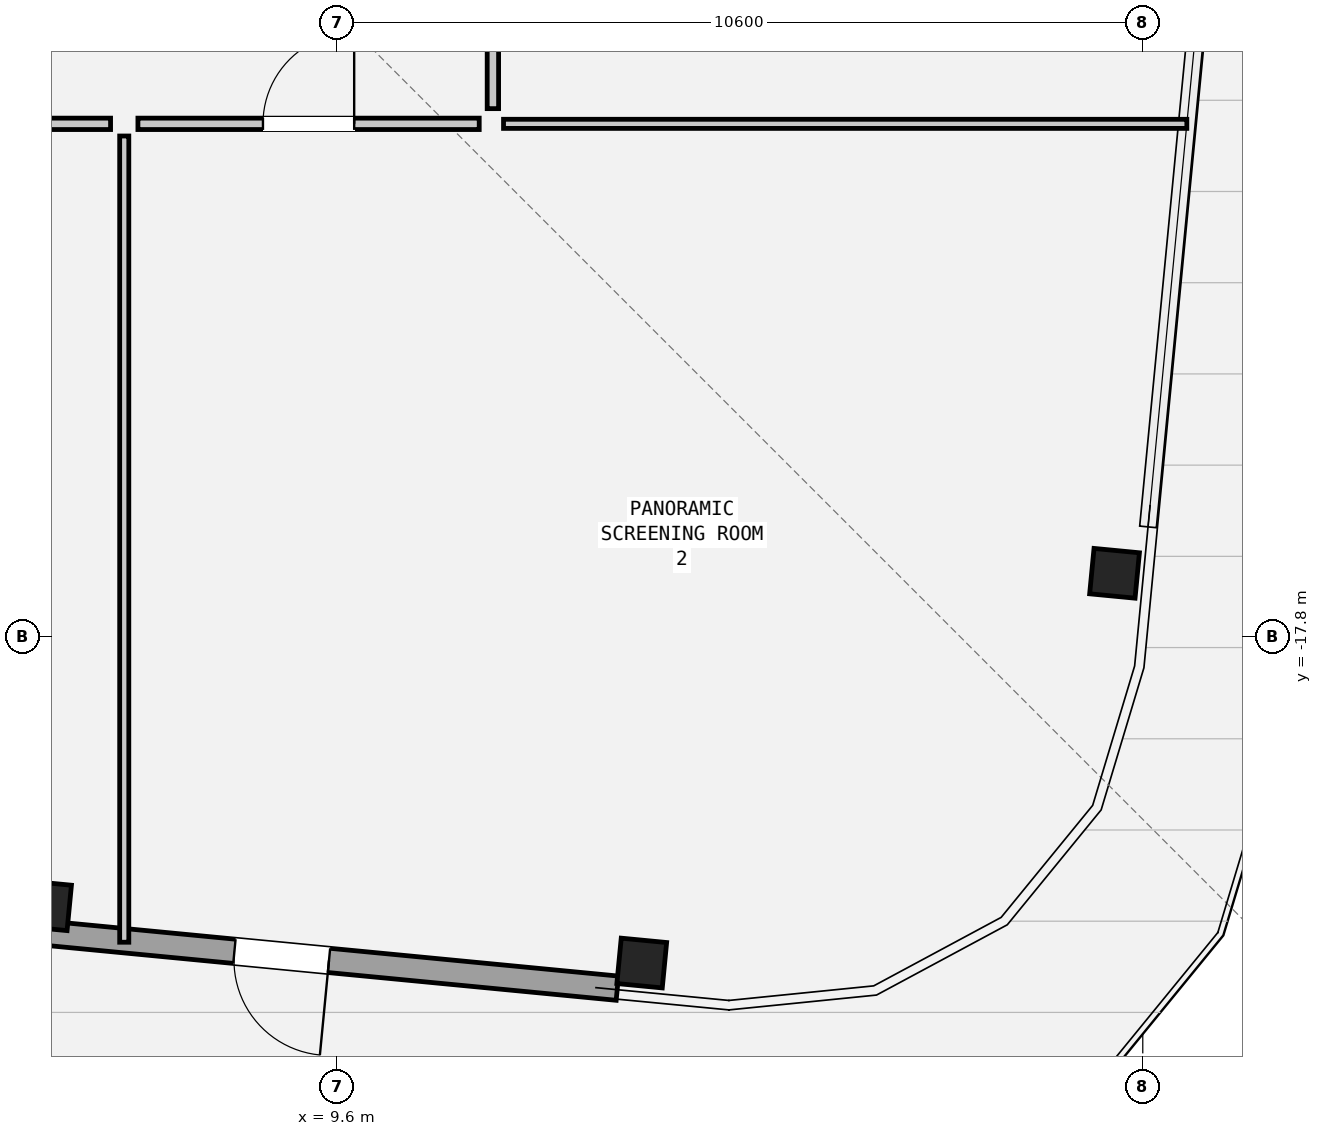
"""IFC4 building model, lengths in metres.
Left out: names, types, materials, properties, quantities, classifications, styles, units other than length and angle.
Written with IfcOpenShell. Run it as: python <this file> out.ifc"""

import sys

from ifc_helpers import new_model, si_unit, direction, frame, frame_2d, origin, origin_2d, place, context, subcontext, project, spatial, rectangle, hollow_rectangle, extrude, element, fill, save


model = new_model("IFC4")
c1 = context("Model", 3, precision=1e-05, world=origin(), true_north=direction((0.0, 1.0)))
c2 = subcontext(c1, "Body", "Model", "MODEL_VIEW")
j1 = project(units=[si_unit("LENGTHUNIT", "METRE"), si_unit("PLANEANGLEUNIT", "RADIAN")], contexts=[c1])
p1 = place(None, origin())
s1 = spatial("IfcSite", under=j1, at=p1, CompositionType="ELEMENT")
p2 = place(p1, origin())
s2 = spatial("IfcBuilding", under=s1, at=p2, CompositionType="ELEMENT")
p3 = place(p2, frame((0.0, 0.0, 276.95)))
s3 = spatial("IfcBuildingStorey", under=s2, at=p3, CompositionType="ELEMENT", Elevation=276.95)
for number, where, z_axis, x_axis in (
    (1, (5.778, -21.336, 0.0), (0.0, 0.0, 1.0), (0.995, -0.096, 0.0)),
    (2, (13.608, -22.09, 0.0), (0.0, 0.0, 1.0), (0.995, -0.096, 0.0)),
    (3, (19.829, -16.963, 0.0), (0.0, 0.0, 1.0), (0.096, 0.995, 0.0)),
):
    element("IfcColumn", number, at=place(p3, frame(where, z_axis=z_axis, x_axis=x_axis)), inside=s3, PredefinedType="COLUMN", context=c2, shape_type="SweptSolid", body=[
        extrude(hollow_rectangle(XDim=0.6, YDim=0.6, WallThickness=0.04, at=origin_2d()), origin(), (0.0, 0.0, 1.0), 3.6),
    ])
p4 = place(p3, frame((13.287, -22.421, 0.0), z_axis=(0.0, 0.0, 1.0), x_axis=(-0.995396042099, 0.095847375411, 0.0)))
e4 = element("IfcWall", 4, at=p4, inside=s3, PredefinedType="SOLIDWALL", context=c2, shape_type="SweptSolid", body=[
    extrude(rectangle(XDim=23.024, YDim=0.32, at=frame_2d((11.512, 0.0))), origin(), (0.0, 0.0, 1.0), 2.984),
])
p5 = place(p4, frame((3.811, 0.0, 0.0)))
e5 = element("IfcOpeningElement", 5, at=p5, cuts=e4, PredefinedType="OPENING", context=c2, shape_type="SweptSolid", body=[
    extrude(rectangle(XDim=1.25, YDim=2.02, at=frame_2d((0.625, 1.01))), frame((0.0, 0.172, 0.0), z_axis=(0.0, -1.0, 0.0), x_axis=(1.0, 0.0, 0.0)), (0.0, 0.0, 1.0), 0.344),
])
p6 = place(p3, frame((11.79, -11.05, 0.0), z_axis=(0.0, 0.0, 1.0), x_axis=(1.0, 0.0, 0.0)))
e6 = element("IfcWall", 6, at=p6, inside=s3, PredefinedType="PARTITIONING", context=c2, shape_type="SweptSolid", body=[
    extrude(rectangle(XDim=8.99, YDim=0.12, at=frame_2d((4.495, 0.0))), origin(), (0.0, 0.0, 1.0), 3.41),
])
p7 = place(p3, frame((6.8, -21.817, 0.0), z_axis=(0.0, 0.0, 1.0), x_axis=(0.0, 1.0, 0.0)))
e7 = element("IfcWall", 7, at=p7, inside=s3, PredefinedType="PARTITIONING", context=c2, shape_type="SweptSolid", body=[
    extrude(rectangle(XDim=10.607, YDim=0.12, at=frame_2d((5.303, 0.0))), origin(), (0.0, 0.0, 1.0), 3.41),
])
p8 = place(p3, frame((0.18, -11.05, 0.0), z_axis=(0.0, 0.0, 1.0), x_axis=(1.0, 0.0, 0.0)))
e8 = element("IfcWall", 8, at=p8, inside=s3, PredefinedType="PARTITIONING", context=c2, shape_type="SweptSolid", body=[
    extrude(rectangle(XDim=6.44, YDim=0.15, at=frame_2d((3.22, 0.0))), origin(), (0.0, 0.0, 1.0), 3.41),
])
p9 = place(p8, frame((2.62, 0.0, 0.0)))
e9 = element("IfcOpeningElement", 9, at=p9, cuts=e8, PredefinedType="OPENING", context=c2, shape_type="SweptSolid", body=[
    extrude(rectangle(XDim=1.2, YDim=2.1, at=frame_2d((0.6, 1.05))), frame((0.0, 0.087, 0.0), z_axis=(0.0, -1.0, 0.0), x_axis=(1.0, 0.0, 0.0)), (0.0, 0.0, 1.0), 0.174),
])
p10 = place(p3, frame((6.98, -11.05, 0.0), z_axis=(0.0, 0.0, 1.0), x_axis=(1.0, 0.0, 0.0)))
e10 = element("IfcWall", 10, at=p10, inside=s3, PredefinedType="PARTITIONING", context=c2, shape_type="SweptSolid", body=[
    extrude(rectangle(XDim=4.49, YDim=0.15, at=frame_2d((2.245, 0.0))), origin(), (0.0, 0.0, 1.0), 3.41),
])
p11 = place(p10, frame((1.645, 0.0, 0.0)))
e11 = element("IfcOpeningElement", 11, at=p11, cuts=e10, PredefinedType="OPENING", context=c2, shape_type="SweptSolid", body=[
    extrude(rectangle(XDim=1.2, YDim=2.1, at=frame_2d((0.6, 1.05))), frame((0.0, 0.087, 0.0), z_axis=(0.0, -1.0, 0.0), x_axis=(1.0, 0.0, 0.0)), (0.0, 0.0, 1.0), 0.174),
])
p12 = place(p3, frame((11.65, -10.85, 0.0), z_axis=(0.0, 0.0, 1.0), x_axis=(0.0, 1.0, 0.0)))
e12 = element("IfcWall", 12, at=p12, inside=s3, PredefinedType="PARTITIONING", context=c2, shape_type="SweptSolid", body=[
    extrude(rectangle(XDim=8.29, YDim=0.15, at=frame_2d((4.145, 0.0))), origin(), (0.0, 0.0, 1.0), 3.41),
])
p13 = place(p12, frame((3.67, 0.0, 0.0)))
e13 = element("IfcOpeningElement", 13, at=p13, cuts=e12, PredefinedType="OPENING", context=c2, shape_type="SweptSolid", body=[
    extrude(rectangle(XDim=0.95, YDim=2.1, at=frame_2d((0.475, 1.05))), frame((0.0, 0.087, 0.0), z_axis=(0.0, -1.0, 0.0), x_axis=(1.0, 0.0, 0.0)), (0.0, 0.0, 1.0), 0.174),
])
p14 = place(p5, origin())
e14 = element("IfcDoor", 14, at=p14, inside=s3, OperationType="SINGLE_SWING_LEFT", PredefinedType="DOOR", context=c2, shape_type="SweptSolid", body=[
    extrude(rectangle(XDim=1.25, YDim=2.02, at=frame_2d((0.625, 1.01))), frame((0.0, 0.025, 0.0), z_axis=(0.0, -1.0, 0.0), x_axis=(1.0, 0.0, 0.0)), (0.0, 0.0, 1.0), 0.05),
])
fill(e5, e14)
p15 = place(p11, origin())
e15 = element("IfcDoor", 15, at=p15, inside=s3, OperationType="SINGLE_SWING_RIGHT", PredefinedType="DOOR", context=c2, shape_type="SweptSolid", body=[
    extrude(rectangle(XDim=1.2, YDim=2.1, at=frame_2d((0.6, 1.05))), frame((0.0, 0.025, 0.0), z_axis=(0.0, -1.0, 0.0), x_axis=(1.0, 0.0, 0.0)), (0.0, 0.0, 1.0), 0.05),
])
fill(e11, e15)
save(model, sys.argv[1])
